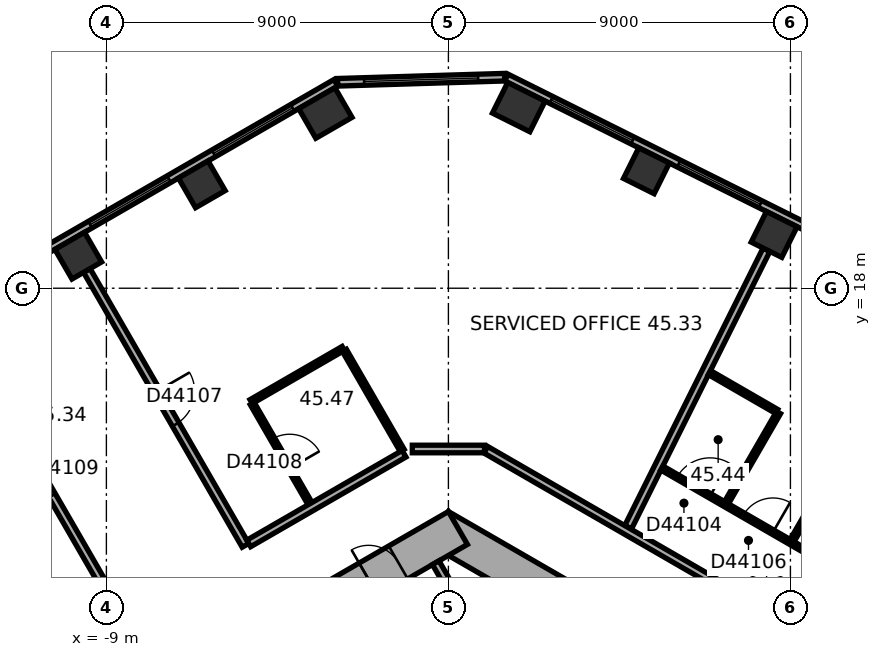
"""IFC4 building model, lengths in metres.
Left out: names, types, materials, properties, quantities, classifications, styles, units other than length and angle.
Written with IfcOpenShell. Run it as: python <this file> out.ifc"""

import sys

from ifc_helpers import new_model, si_unit, direction, frame, frame_2d, origin, origin_2d, place, context, subcontext, project, spatial, rectangle, extrude, element, fill, save


model = new_model("IFC4")
c1 = context("Model", 3, precision=1e-05, world=origin(), true_north=direction((0.0, 1.0)))
c2 = subcontext(c1, "Body", "Model", "MODEL_VIEW")
j1 = project(units=[si_unit("LENGTHUNIT", "METRE"), si_unit("PLANEANGLEUNIT", "RADIAN")], contexts=[c1])
p1 = place(None, origin())
s1 = spatial("IfcSite", under=j1, at=p1, CompositionType="ELEMENT")
p2 = place(p1, origin())
s2 = spatial("IfcBuilding", under=s1, at=p2, CompositionType="ELEMENT")
p3 = place(p2, frame((0.0, 0.0, 183.6)))
s3 = spatial("IfcBuildingStorey", under=s2, at=p3, CompositionType="ELEMENT", Elevation=183.6)
for number, where, z_axis, x_axis in (
    (1, (8.571, 19.416, 0.0), (0.0, 0.0, 1.0), (-0.895, 0.446, 0.0)),
    (2, (5.211, 21.091, 0.0), (0.0, 0.0, 1.0), (-0.895, 0.446, 0.0)),
):
    element("IfcColumn", number, at=place(p3, frame(where, z_axis=z_axis, x_axis=x_axis)), inside=s3, PredefinedType="COLUMN", context=c2, shape_type="SweptSolid", body=[
        extrude(rectangle(XDim=0.9, YDim=0.9, at=origin_2d()), origin(), (0.0, 0.0, 1.0), 3.7),
    ])
for number, where, z_axis, x_axis in (
    (3, (1.852, 22.766, 0.0), (0.0, 0.0, 1.0), (-0.895, 0.446, 0.0)),
    (4, (-3.238, 22.61, 0.0), (0.0, 0.0, 1.0), (-0.866, -0.5, 0.0)),
):
    element("IfcColumn", number, at=place(p3, frame(where, z_axis=z_axis, x_axis=x_axis)), inside=s3, PredefinedType="COLUMN", context=c2, shape_type="SweptSolid", body=[
        extrude(rectangle(XDim=1.1, YDim=0.9, at=origin_2d()), origin(), (0.0, 0.0, 1.0), 3.7),
    ])
for number, where, z_axis, x_axis in (
    (5, (-6.489, 20.733, 0.0), (0.0, 0.0, 1.0), (-0.866, -0.5, 0.0)),
    (6, (-9.74, 18.856, 0.0), (0.0, 0.0, 1.0), (-0.866, -0.5, 0.0)),
):
    element("IfcColumn", number, at=place(p3, frame(where, z_axis=z_axis, x_axis=x_axis)), inside=s3, PredefinedType="COLUMN", context=c2, shape_type="SweptSolid", body=[
        extrude(rectangle(XDim=0.9, YDim=0.9, at=origin_2d()), origin(), (0.0, 0.0, 1.0), 3.7),
    ])
p4 = place(p3, frame((10.25, 5.629, 0.0), z_axis=(0.0, 0.0, 1.0), x_axis=(-0.866022616891, 0.50000482701, 0.0)))
e7 = element("IfcWall", 7, at=p4, inside=s3, PredefinedType="SHEAR", context=c2, shape_type="SweptSolid", body=[
    extrude(rectangle(XDim=12.125, YDim=1.0, at=frame_2d((6.062, 0.0))), origin(), (0.0, 0.0, 1.0), 3.7),
])
p5 = place(p4, frame((5.312, 0.0, 0.0)))
e8 = element("IfcOpeningElement", 8, at=p5, cuts=e7, PredefinedType="OPENING", context=c2, shape_type="SweptSolid", body=[
    extrude(rectangle(XDim=0.9, YDim=2.1, at=frame_2d((0.45, 1.05))), frame((0.0, 0.51, 0.0), z_axis=(0.0, -1.0, 0.0), x_axis=(1.0, 0.0, 0.0)), (0.0, 0.0, 1.0), 1.02),
])
p6 = place(p3, frame((0.25, 11.691, 0.0), z_axis=(0.0, 0.0, 1.0), x_axis=(-0.866022616891, -0.50000482701, 0.0)))
e9 = element("IfcWall", 9, at=p6, inside=s3, PredefinedType="SHEAR", context=c2, shape_type="SweptSolid", body=[
    extrude(rectangle(XDim=12.125, YDim=1.0, at=frame_2d((6.062, 0.0))), origin(), (0.0, 0.0, 1.0), 3.7),
])
p7 = place(p6, frame((6.262, 0.0, 0.0)))
e10 = element("IfcOpeningElement", 10, at=p7, cuts=e9, PredefinedType="OPENING", context=c2, shape_type="SweptSolid", body=[
    extrude(rectangle(XDim=1.5, YDim=2.1, at=frame_2d((0.75, 1.05))), frame((0.0, 0.51, 0.0), z_axis=(0.0, -1.0, 0.0), x_axis=(1.0, 0.0, 0.0)), (0.0, 0.0, 1.0), 1.02),
])
p8 = place(p6, frame((1.812, 0.0, 0.0)))
e11 = element("IfcOpeningElement", 11, at=p8, cuts=e9, PredefinedType="OPENING", context=c2, shape_type="SweptSolid", body=[
    extrude(rectangle(XDim=0.9, YDim=2.1, at=frame_2d((0.45, 1.05))), frame((0.0, 0.51, 0.0), z_axis=(0.0, -1.0, 0.0), x_axis=(1.0, 0.0, 0.0)), (0.0, 0.0, 1.0), 1.02),
])
p9 = place(p6, frame((4.412, 0.0, 0.0)))
e12 = element("IfcOpeningElement", 12, at=p9, cuts=e9, PredefinedType="OPENING", context=c2, shape_type="SweptSolid", body=[
    extrude(rectangle(XDim=0.9, YDim=2.1, at=frame_2d((0.45, 1.05))), frame((0.0, 0.51, 0.0), z_axis=(0.0, -1.0, 0.0), x_axis=(1.0, 0.0, 0.0)), (0.0, 0.0, 1.0), 1.02),
])
p10 = place(p3, frame((19.464, 14.599, 0.0), z_axis=(0.0, 0.0, 1.0), x_axis=(-0.894935755043, 0.446195018289, 0.0)))
e13 = element("IfcWall", 13, at=p10, inside=s3, PredefinedType="STANDARD", context=c2, shape_type="SweptSolid", body=[
    extrude(rectangle(XDim=20.044, YDim=0.2, at=frame_2d((10.022, 0.0))), origin(), (0.0, 0.0, 1.0), 3.7),
])
p11 = place(p10, frame((1.313, 0.0, 0.9)))
e14 = element("IfcOpeningElement", 14, at=p11, cuts=e13, PredefinedType="OPENING", context=c2, shape_type="SweptSolid", body=[
    extrude(rectangle(XDim=2.4, YDim=2.0, at=frame_2d((1.2, 1.0))), frame((0.0, 0.11, 0.0), z_axis=(0.0, -1.0, 0.0), x_axis=(1.0, 0.0, 0.0)), (0.0, 0.0, 1.0), 0.22),
])
p12 = place(p10, frame((5.067, 0.0, 0.9)))
e15 = element("IfcOpeningElement", 15, at=p12, cuts=e13, PredefinedType="OPENING", context=c2, shape_type="SweptSolid", body=[
    extrude(rectangle(XDim=2.4, YDim=2.0, at=frame_2d((1.2, 1.0))), frame((0.0, 0.11, 0.0), z_axis=(0.0, -1.0, 0.0), x_axis=(1.0, 0.0, 0.0)), (0.0, 0.0, 1.0), 0.22),
])
p13 = place(p10, frame((8.821, 0.0, 0.9)))
e16 = element("IfcOpeningElement", 16, at=p13, cuts=e13, PredefinedType="OPENING", context=c2, shape_type="SweptSolid", body=[
    extrude(rectangle(XDim=2.4, YDim=2.0, at=frame_2d((1.2, 1.0))), frame((0.0, 0.11, 0.0), z_axis=(0.0, -1.0, 0.0), x_axis=(1.0, 0.0, 0.0)), (0.0, 0.0, 1.0), 0.22),
])
p14 = place(p10, frame((12.575, 0.0, 0.9)))
e17 = element("IfcOpeningElement", 17, at=p14, cuts=e13, PredefinedType="OPENING", context=c2, shape_type="SweptSolid", body=[
    extrude(rectangle(XDim=2.4, YDim=2.0, at=frame_2d((1.2, 1.0))), frame((0.0, 0.11, 0.0), z_axis=(0.0, -1.0, 0.0), x_axis=(1.0, 0.0, 0.0)), (0.0, 0.0, 1.0), 0.22),
])
p15 = place(p10, frame((16.329, 0.0, 0.9)))
e18 = element("IfcOpeningElement", 18, at=p15, cuts=e13, PredefinedType="OPENING", context=c2, shape_type="SweptSolid", body=[
    extrude(rectangle(XDim=2.4, YDim=2.0, at=frame_2d((1.2, 1.0))), frame((0.0, 0.11, 0.0), z_axis=(0.0, -1.0, 0.0), x_axis=(1.0, 0.0, 0.0)), (0.0, 0.0, 1.0), 0.22),
])
p16 = place(p3, frame((1.479, 23.553, 0.0), z_axis=(0.0, 0.0, 1.0), x_axis=(-0.999534786117, -0.03049936625, 0.0)))
e19 = element("IfcWall", 19, at=p16, inside=s3, PredefinedType="STANDARD", context=c2, shape_type="SweptSolid", body=[
    extrude(rectangle(XDim=4.395, YDim=0.2, at=frame_2d((2.197, 0.0))), origin(), (0.0, 0.0, 1.0), 3.7),
])
p17 = place(p16, frame((0.698, 0.0, 0.9)))
e20 = element("IfcOpeningElement", 20, at=p17, cuts=e19, PredefinedType="OPENING", context=c2, shape_type="SweptSolid", body=[
    extrude(rectangle(XDim=3.0, YDim=2.0, at=frame_2d((1.5, 1.0))), frame((0.0, 0.11, 0.0), z_axis=(0.0, -1.0, 0.0), x_axis=(1.0, 0.0, 0.0)), (0.0, 0.0, 1.0), 0.22),
])
p18 = place(p3, frame((-2.961, 23.405, 0.0), z_axis=(0.0, 0.0, 1.0), x_axis=(-0.866023315909, -0.500003616288, 0.0)))
e21 = element("IfcWall", 21, at=p18, inside=s3, PredefinedType="STANDARD", context=c2, shape_type="SweptSolid", body=[
    extrude(rectangle(XDim=20.044, YDim=0.2, at=frame_2d((10.022, 0.0))), origin(), (0.0, 0.0, 1.0), 3.7),
])
p19 = place(p18, frame((1.314, 0.0, 0.9)))
e22 = element("IfcOpeningElement", 22, at=p19, cuts=e21, PredefinedType="OPENING", context=c2, shape_type="SweptSolid", body=[
    extrude(rectangle(XDim=2.4, YDim=2.0, at=frame_2d((1.2, 1.0))), frame((0.0, 0.11, 0.0), z_axis=(0.0, -1.0, 0.0), x_axis=(1.0, 0.0, 0.0)), (0.0, 0.0, 1.0), 0.22),
])
p20 = place(p18, frame((5.069, 0.0, 0.9)))
e23 = element("IfcOpeningElement", 23, at=p20, cuts=e21, PredefinedType="OPENING", context=c2, shape_type="SweptSolid", body=[
    extrude(rectangle(XDim=2.4, YDim=2.0, at=frame_2d((1.2, 1.0))), frame((0.0, 0.11, 0.0), z_axis=(0.0, -1.0, 0.0), x_axis=(1.0, 0.0, 0.0)), (0.0, 0.0, 1.0), 0.22),
])
p21 = place(p18, frame((8.823, 0.0, 0.9)))
e24 = element("IfcOpeningElement", 24, at=p21, cuts=e21, PredefinedType="OPENING", context=c2, shape_type="SweptSolid", body=[
    extrude(rectangle(XDim=2.4, YDim=2.0, at=frame_2d((1.2, 1.0))), frame((0.0, 0.11, 0.0), z_axis=(0.0, -1.0, 0.0), x_axis=(1.0, 0.0, 0.0)), (0.0, 0.0, 1.0), 0.22),
])
p22 = place(p18, frame((12.577, 0.0, 0.9)))
e25 = element("IfcOpeningElement", 25, at=p22, cuts=e21, PredefinedType="OPENING", context=c2, shape_type="SweptSolid", body=[
    extrude(rectangle(XDim=2.4, YDim=2.0, at=frame_2d((1.2, 1.0))), frame((0.0, 0.11, 0.0), z_axis=(0.0, -1.0, 0.0), x_axis=(1.0, 0.0, 0.0)), (0.0, 0.0, 1.0), 0.22),
])
p23 = place(p18, frame((16.331, 0.0, 0.9)))
e26 = element("IfcOpeningElement", 26, at=p23, cuts=e21, PredefinedType="OPENING", context=c2, shape_type="SweptSolid", body=[
    extrude(rectangle(XDim=2.4, YDim=2.0, at=frame_2d((1.2, 1.0))), frame((0.0, 0.11, 0.0), z_axis=(0.0, -1.0, 0.0), x_axis=(1.0, 0.0, 0.0)), (0.0, 0.0, 1.0), 0.22),
])
p24 = place(p3, frame((0.767, 8.872, 0.0), z_axis=(0.0, 0.0, 1.0), x_axis=(-0.499994660107, 0.866028486751, 0.0)))
e27 = element("IfcWall", 27, at=p24, inside=s3, PredefinedType="PARTITIONING", context=c2, shape_type="SweptSolid", body=[
    extrude(rectangle(XDim=2.2, YDim=0.2, at=frame_2d((1.1, 0.0))), origin(), (0.0, 0.0, 1.0), 3.42),
])
p25 = place(p3, frame((-12.766, 16.589, 0.0), z_axis=(0.0, 0.0, 1.0), x_axis=(0.500010139422, -0.866019549707, 0.0)))
e28 = element("IfcWall", 28, at=p25, inside=s3, PredefinedType="PARTITIONING", context=c2, shape_type="SweptSolid", body=[
    extrude(rectangle(XDim=8.35, YDim=0.2, at=frame_2d((4.175, 0.0))), origin(), (0.0, 0.0, 1.0), 3.42),
])
p26 = place(p25, frame((3.675, 0.0, 0.0)))
e29 = element("IfcOpeningElement", 29, at=p26, cuts=e28, PredefinedType="OPENING", context=c2, shape_type="SweptSolid", body=[
    extrude(rectangle(XDim=1.0, YDim=2.1, at=frame_2d((0.5, 1.05))), frame((0.0, 0.11, 0.0), z_axis=(0.0, -1.0, 0.0), x_axis=(1.0, 0.0, 0.0)), (0.0, 0.0, 1.0), 0.22),
])
p27 = place(p3, frame((-9.515, 18.466, 0.0), z_axis=(0.0, 0.0, 1.0), x_axis=(0.500010139422, -0.866019549707, 0.0)))
e30 = element("IfcWall", 30, at=p27, inside=s3, PredefinedType="PARTITIONING", context=c2, shape_type="SweptSolid", body=[
    extrude(rectangle(XDim=8.35, YDim=0.2, at=frame_2d((4.175, 0.0))), origin(), (0.0, 0.0, 1.0), 2.87),
])
p28 = place(p27, frame((3.675, 0.0, 0.0)))
e31 = element("IfcOpeningElement", 31, at=p28, cuts=e30, PredefinedType="OPENING", context=c2, shape_type="SweptSolid", body=[
    extrude(rectangle(XDim=1.0, YDim=2.1, at=frame_2d((0.5, 1.05))), frame((0.0, 0.11, 0.0), z_axis=(0.0, -1.0, 0.0), x_axis=(1.0, 0.0, 0.0)), (0.0, 0.0, 1.0), 0.22),
])
p29 = place(p3, frame((-5.191, 15.016, 0.0), z_axis=(0.0, 0.0, 1.0), x_axis=(0.866034573852, 0.49998411664, 0.0)))
e32 = element("IfcWall", 32, at=p29, inside=s3, PredefinedType="PARTITIONING", context=c2, shape_type="SweptSolid", body=[
    extrude(rectangle(XDim=2.8, YDim=0.12, at=frame_2d((1.4, 0.0))), origin(), (0.0, 0.0, 1.0), 3.42),
])
p30 = place(p3, frame((-3.641, 12.331, 0.0), z_axis=(0.0, 0.0, 1.0), x_axis=(-0.499991248344, 0.866030456496, 0.0)))
e33 = element("IfcWall", 33, at=p30, inside=s3, PredefinedType="PARTITIONING", context=c2, shape_type="SweptSolid", body=[
    extrude(rectangle(XDim=3.04, YDim=0.12, at=frame_2d((1.52, 0.0))), origin(), (0.0, 0.0, 1.0), 3.42),
])
p31 = place(p30, frame((1.07, 0.0, 0.0)))
e34 = element("IfcOpeningElement", 34, at=p31, cuts=e33, PredefinedType="OPENING", context=c2, shape_type="SweptSolid", body=[
    extrude(rectangle(XDim=0.9, YDim=2.1, at=frame_2d((0.45, 1.05))), frame((0.0, 0.07, 0.0), z_axis=(0.0, -1.0, 0.0), x_axis=(1.0, 0.0, 0.0)), (0.0, 0.0, 1.0), 0.14),
])
p32 = place(p3, frame((-2.737, 16.364, 0.0), z_axis=(0.0, 0.0, 1.0), x_axis=(0.500026023896, -0.86601037836, 0.0)))
e35 = element("IfcWall", 35, at=p32, inside=s3, PredefinedType="PARTITIONING", context=c2, shape_type="SweptSolid", body=[
    extrude(rectangle(XDim=3.04, YDim=0.12, at=frame_2d((1.52, 0.0))), origin(), (0.0, 0.0, 1.0), 3.42),
])
p33 = place(p3, frame((-1.167, 13.645, 0.0), z_axis=(0.0, 0.0, 1.0), x_axis=(-0.866034830959, -0.499983671299, 0.0)))
e36 = element("IfcWall", 36, at=p33, inside=s3, PredefinedType="PARTITIONING", context=c2, shape_type="SweptSolid", body=[
    extrude(rectangle(XDim=4.719, YDim=0.2, at=frame_2d((2.36, 0.0))), origin(), (0.0, 0.0, 1.0), 3.42),
])
p34 = place(p3, frame((0.95, 13.77, 0.0), z_axis=(0.0, 0.0, 1.0), x_axis=(-1.0, 0.0, 0.0)))
e37 = element("IfcWall", 37, at=p34, inside=s3, PredefinedType="PARTITIONING", context=c2, shape_type="SweptSolid", body=[
    extrude(rectangle(XDim=1.9, YDim=0.2, at=frame_2d((0.95, 0.0))), origin(), (0.0, 0.0, 1.0), 3.42),
])
p35 = place(p3, frame((7.318, 12.356, 0.0), z_axis=(0.0, 0.0, 1.0), x_axis=(0.499982138324, 0.866035715982, 0.0)))
e38 = element("IfcWall", 38, at=p35, inside=s3, PredefinedType="PARTITIONING", context=c2, shape_type="SweptSolid", body=[
    extrude(rectangle(XDim=2.74, YDim=0.12, at=frame_2d((1.37, 0.0))), origin(), (0.0, 0.0, 1.0), 3.42),
])
p36 = place(p3, frame((8.37, 19.013, 0.0), z_axis=(0.0, 0.0, 1.0), x_axis=(-0.446183598632, -0.894941448538, 0.0)))
e39 = element("IfcWall", 39, at=p36, inside=s3, PredefinedType="PARTITIONING", context=c2, shape_type="SweptSolid", body=[
    extrude(rectangle(XDim=8.156, YDim=0.2, at=frame_2d((4.078, 0.0))), origin(), (0.0, 0.0, 1.0), 3.42),
])
p37 = place(p3, frame((8.636, 14.759, 0.0), z_axis=(0.0, 0.0, 1.0), x_axis=(-0.866010195725, 0.500026340207, 0.0)))
e40 = element("IfcWall", 40, at=p37, inside=s3, PredefinedType="PARTITIONING", context=c2, shape_type="SweptSolid", body=[
    extrude(rectangle(XDim=2.04, YDim=0.12, at=frame_2d((1.02, 0.0))), origin(), (0.0, 0.0, 1.0), 3.42),
])
p38 = place(p3, frame((11.196, 7.854, 0.0), z_axis=(0.0, 0.0, 1.0), x_axis=(-0.866023877043, 0.500002644385, 0.0)))
e41 = element("IfcWall", 41, at=p38, inside=s3, PredefinedType="PARTITIONING", context=c2, shape_type="SweptSolid", body=[
    extrude(rectangle(XDim=11.792, YDim=0.2, at=frame_2d((5.896, 0.0))), origin(), (0.0, 0.0, 1.0), 3.42),
])
p39 = place(p38, frame((3.261, 0.0, 0.0)))
e42 = element("IfcOpeningElement", 42, at=p39, cuts=e41, PredefinedType="OPENING", context=c2, shape_type="SweptSolid", body=[
    extrude(rectangle(XDim=1.0, YDim=2.1, at=frame_2d((0.5, 1.05))), frame((0.0, 0.11, 0.0), z_axis=(0.0, -1.0, 0.0), x_axis=(1.0, 0.0, 0.0)), (0.0, 0.0, 1.0), 0.22),
])
p40 = place(p3, frame((11.959, 9.608, 0.0), z_axis=(0.0, 0.0, 1.0), x_axis=(-0.866018452427, 0.500012039911, 0.0)))
e43 = element("IfcWall", 43, at=p40, inside=s3, PredefinedType="PARTITIONING", context=c2, shape_type="SweptSolid", body=[
    extrude(rectangle(XDim=7.322, YDim=0.12, at=frame_2d((3.661, 0.0))), origin(), (0.0, 0.0, 1.0), 3.42),
])
p41 = place(p40, frame((5.858, 0.0, 0.0)))
e44 = element("IfcOpeningElement", 44, at=p41, cuts=e43, PredefinedType="OPENING", context=c2, shape_type="SweptSolid", body=[
    extrude(rectangle(XDim=1.0, YDim=2.1, at=frame_2d((0.5, 1.05))), frame((0.0, 0.07, 0.0), z_axis=(0.0, -1.0, 0.0), x_axis=(1.0, 0.0, 0.0)), (0.0, 0.0, 1.0), 0.14),
])
p42 = place(p40, frame((1.25, 0.0, 0.0)))
e45 = element("IfcOpeningElement", 45, at=p42, cuts=e43, PredefinedType="OPENING", context=c2, shape_type="SweptSolid", body=[
    extrude(rectangle(XDim=0.9, YDim=2.1, at=frame_2d((0.45, 1.05))), frame((0.0, 0.07, 0.0), z_axis=(0.0, -1.0, 0.0), x_axis=(1.0, 0.0, 0.0)), (0.0, 0.0, 1.0), 0.14),
])
p43 = place(p40, frame((3.947, 0.0, 0.0)))
e46 = element("IfcOpeningElement", 46, at=p43, cuts=e43, PredefinedType="OPENING", context=c2, shape_type="SweptSolid", body=[
    extrude(rectangle(XDim=0.9, YDim=2.1, at=frame_2d((0.45, 1.05))), frame((0.0, 0.07, 0.0), z_axis=(0.0, -1.0, 0.0), x_axis=(1.0, 0.0, 0.0)), (0.0, 0.0, 1.0), 0.14),
])
p44 = place(p3, frame((12.325, 17.041, 0.0), z_axis=(0.0, 0.0, 1.0), x_axis=(-0.499985538654, -0.866033752885, 0.0)))
e47 = element("IfcWall", 47, at=p44, inside=s3, PredefinedType="PARTITIONING", context=c2, shape_type="SweptSolid", body=[
    extrude(rectangle(XDim=6.56, YDim=0.12, at=frame_2d((3.28, 0.0))), origin(), (0.0, 0.0, 1.0), 3.42),
])
p45 = place(p14, origin())
e48 = element("IfcWindow", 48, at=p45, inside=s3, PartitioningType="SINGLE_PANEL", PredefinedType="WINDOW", context=c2, shape_type="SweptSolid", body=[
    extrude(rectangle(XDim=2.4, YDim=2.0, at=frame_2d((1.2, 1.0))), frame((0.0, 0.03, 0.0), z_axis=(0.0, -1.0, 0.0), x_axis=(1.0, 0.0, 0.0)), (0.0, 0.0, 1.0), 0.06),
])
fill(e17, e48)
p46 = place(p15, origin())
e49 = element("IfcWindow", 49, at=p46, inside=s3, PartitioningType="SINGLE_PANEL", PredefinedType="WINDOW", context=c2, shape_type="SweptSolid", body=[
    extrude(rectangle(XDim=2.4, YDim=2.0, at=frame_2d((1.2, 1.0))), frame((0.0, 0.03, 0.0), z_axis=(0.0, -1.0, 0.0), x_axis=(1.0, 0.0, 0.0)), (0.0, 0.0, 1.0), 0.06),
])
fill(e18, e49)
p47 = place(p17, origin())
e50 = element("IfcWindow", 50, at=p47, inside=s3, PartitioningType="SINGLE_PANEL", PredefinedType="WINDOW", context=c2, shape_type="SweptSolid", body=[
    extrude(rectangle(XDim=3.0, YDim=2.0, at=frame_2d((1.5, 1.0))), frame((0.0, 0.03, 0.0), z_axis=(0.0, -1.0, 0.0), x_axis=(1.0, 0.0, 0.0)), (0.0, 0.0, 1.0), 0.06),
])
fill(e20, e50)
p48 = place(p19, origin())
e51 = element("IfcWindow", 51, at=p48, inside=s3, PartitioningType="SINGLE_PANEL", PredefinedType="WINDOW", context=c2, shape_type="SweptSolid", body=[
    extrude(rectangle(XDim=2.4, YDim=2.0, at=frame_2d((1.2, 1.0))), frame((0.0, 0.03, 0.0), z_axis=(0.0, -1.0, 0.0), x_axis=(1.0, 0.0, 0.0)), (0.0, 0.0, 1.0), 0.06),
])
fill(e22, e51)
p49 = place(p20, origin())
e52 = element("IfcWindow", 52, at=p49, inside=s3, PartitioningType="SINGLE_PANEL", PredefinedType="WINDOW", context=c2, shape_type="SweptSolid", body=[
    extrude(rectangle(XDim=2.4, YDim=2.0, at=frame_2d((1.2, 1.0))), frame((0.0, 0.03, 0.0), z_axis=(0.0, -1.0, 0.0), x_axis=(1.0, 0.0, 0.0)), (0.0, 0.0, 1.0), 0.06),
])
fill(e23, e52)
p50 = place(p8, origin())
e53 = element("IfcDoor", 53, at=p50, inside=s3, OperationType="SINGLE_SWING_LEFT", PredefinedType="DOOR", context=c2, shape_type="SweptSolid", body=[
    extrude(rectangle(XDim=0.9, YDim=2.1, at=frame_2d((0.45, 1.05))), frame((0.0, 0.025, 0.0), z_axis=(0.0, -1.0, 0.0), x_axis=(1.0, 0.0, 0.0)), (0.0, 0.0, 1.0), 0.05),
])
fill(e11, e53)
p51 = place(p41, origin())
e54 = element("IfcDoor", 54, at=p51, inside=s3, OperationType="SINGLE_SWING_LEFT", PredefinedType="DOOR", context=c2, shape_type="SweptSolid", body=[
    extrude(rectangle(XDim=1.0, YDim=2.1, at=frame_2d((0.5, 1.05))), frame((0.0, 0.025, 0.0), z_axis=(0.0, -1.0, 0.0), x_axis=(1.0, 0.0, 0.0)), (0.0, 0.0, 1.0), 0.05),
])
fill(e44, e54)
p52 = place(p43, origin())
e55 = element("IfcDoor", 55, at=p52, inside=s3, OperationType="SINGLE_SWING_LEFT", PredefinedType="DOOR", context=c2, shape_type="SweptSolid", body=[
    extrude(rectangle(XDim=0.9, YDim=2.1, at=frame_2d((0.45, 1.05))), frame((0.0, 0.025, 0.0), z_axis=(0.0, -1.0, 0.0), x_axis=(1.0, 0.0, 0.0)), (0.0, 0.0, 1.0), 0.05),
])
fill(e46, e55)
p53 = place(p28, origin())
e56 = element("IfcDoor", 56, at=p53, inside=s3, OperationType="SINGLE_SWING_LEFT", PredefinedType="DOOR", context=c2, shape_type="SweptSolid", body=[
    extrude(rectangle(XDim=1.0, YDim=2.1, at=frame_2d((0.5, 1.05))), frame((0.0, 0.025, 0.0), z_axis=(0.0, -1.0, 0.0), x_axis=(1.0, 0.0, 0.0)), (0.0, 0.0, 1.0), 0.05),
])
fill(e31, e56)
p54 = place(p31, origin())
e57 = element("IfcDoor", 57, at=p54, inside=s3, OperationType="SINGLE_SWING_LEFT", PredefinedType="DOOR", context=c2, shape_type="SweptSolid", body=[
    extrude(rectangle(XDim=0.9, YDim=2.1, at=frame_2d((0.45, 1.05))), frame((0.0, 0.025, 0.0), z_axis=(0.0, -1.0, 0.0), x_axis=(1.0, 0.0, 0.0)), (0.0, 0.0, 1.0), 0.05),
])
fill(e34, e57)
p55 = place(p26, origin())
e58 = element("IfcDoor", 58, at=p55, inside=s3, OperationType="SINGLE_SWING_LEFT", PredefinedType="DOOR", context=c2, shape_type="SweptSolid", body=[
    extrude(rectangle(XDim=1.0, YDim=2.1, at=frame_2d((0.5, 1.05))), frame((0.0, 0.025, 0.0), z_axis=(0.0, -1.0, 0.0), x_axis=(1.0, 0.0, 0.0)), (0.0, 0.0, 1.0), 0.05),
])
fill(e29, e58)
save(model, sys.argv[1])
